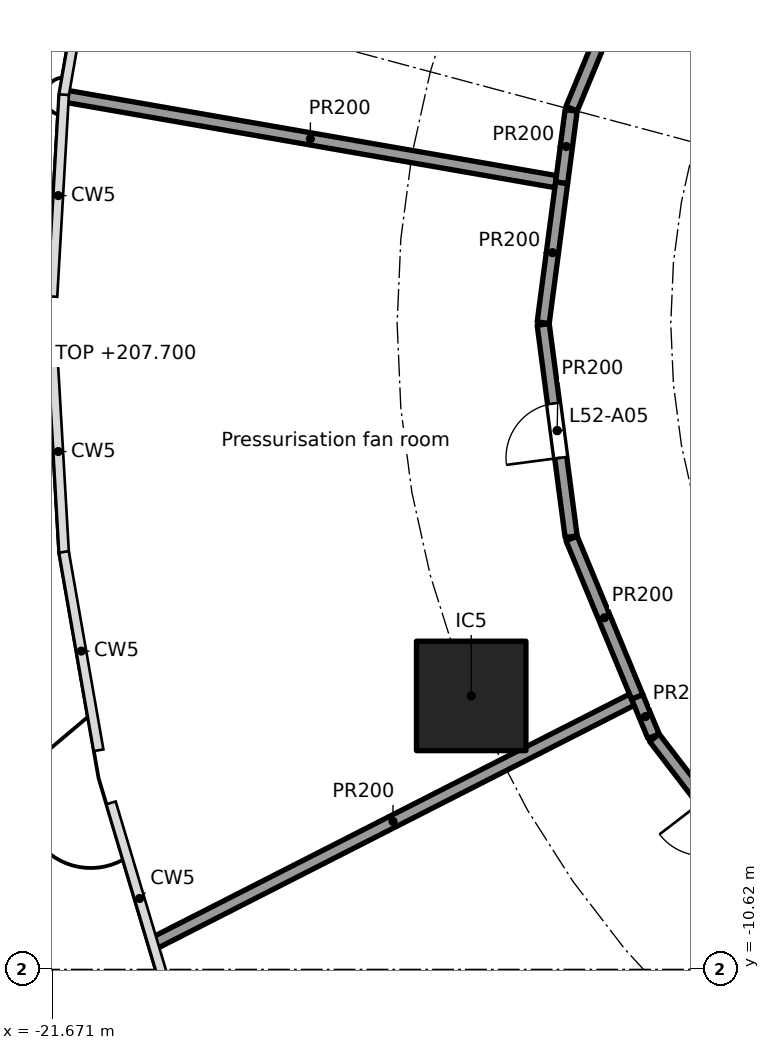
"""IFC4 building model, lengths in metres.
Left out: names, types, materials, properties, quantities, classifications, styles, units other than length and angle.
Written with IfcOpenShell. Run it as: python <this file> out.ifc"""

import sys

from ifc_helpers import new_model, si_unit, direction, frame, frame_2d, origin, origin_2d, place, context, subcontext, project, spatial, rectangle, extrude, element, fill, save


model = new_model("IFC4")
c1 = context("Model", 3, precision=1e-05, world=origin(), true_north=direction((0.0, 1.0)))
c2 = subcontext(c1, "Body", "Model", "MODEL_VIEW")
j1 = project(units=[si_unit("LENGTHUNIT", "METRE"), si_unit("PLANEANGLEUNIT", "RADIAN")], contexts=[c1])
p1 = place(None, origin())
s1 = spatial("IfcSite", under=j1, at=p1, CompositionType="ELEMENT")
p2 = place(p1, origin())
s2 = spatial("IfcBuilding", under=s1, at=p2, CompositionType="ELEMENT")
p3 = place(p2, frame((0.0, 0.0, 206.6)))
s3 = spatial("IfcBuildingStorey", under=s2, at=p3, CompositionType="ELEMENT", Elevation=206.6)
p4 = place(p3, frame((-14.782, -6.123, 0.0), z_axis=(0.0, 0.0, 1.0), x_axis=(1.0, 0.0, 0.0)))
e1 = element("IfcColumn", 1, at=p4, inside=s3, PredefinedType="COLUMN", context=c2, shape_type="SweptSolid", body=[
    extrude(rectangle(XDim=1.8, YDim=1.8, at=origin_2d()), origin(), (0.0, 0.0, 1.0), 5.6),
])
p5 = place(p3, frame((-13.598, 0.015, 0.0), z_axis=(0.0, 0.0, 1.0), x_axis=(0.130476270168, 0.991451432458, 0.0)))
e2 = element("IfcWall", 2, at=p5, inside=s3, PredefinedType="PARTITIONING", context=c2, shape_type="SweptSolid", body=[
    extrude(rectangle(XDim=2.322, YDim=0.2, at=frame_2d((1.161, 0.0))), origin(), (0.0, 0.0, 1.0), 5.34),
])
p6 = place(p3, frame((-13.394, 2.334, 0.0), z_axis=(0.0, 0.0, 1.0), x_axis=(-0.985144930299, 0.171724972867, 0.0)))
e3 = element("IfcWall", 3, at=p6, inside=s3, PredefinedType="PARTITIONING", context=c2, shape_type="SweptSolid", body=[
    extrude(rectangle(XDim=8.188, YDim=0.2, at=frame_2d((4.094, 0.0))), origin(), (0.0, 0.0, 1.0), 5.34),
])
p7 = place(p3, frame((-13.295, 2.317, 0.0), z_axis=(0.0, 0.0, 1.0), x_axis=(0.130454512571, 0.991454295543, 0.0)))
e4 = element("IfcWall", 4, at=p7, inside=s3, PredefinedType="PARTITIONING", context=c2, shape_type="SweptSolid", body=[
    extrude(rectangle(XDim=1.198, YDim=0.2, at=frame_2d((0.599, 0.0))), origin(), (0.0, 0.0, 1.0), 5.34),
])
p8 = place(p3, frame((-13.139, -3.505, 0.0), z_axis=(0.0, 0.0, 1.0), x_axis=(-0.130468866457, 0.991452406768, 0.0)))
e5 = element("IfcWall", 5, at=p8, inside=s3, PredefinedType="PARTITIONING", context=c2, shape_type="SweptSolid", body=[
    extrude(rectangle(XDim=3.52, YDim=0.2, at=frame_2d((1.76, 0.0))), origin(), (0.0, 0.0, 1.0), 5.34),
])
p9 = place(p8, frame((1.31, 0.0, 0.0)))
e6 = element("IfcOpeningElement", 6, at=p9, cuts=e5, PredefinedType="OPENING", context=c2, shape_type="SweptSolid", body=[
    extrude(rectangle(XDim=0.9, YDim=2.1, at=frame_2d((0.45, 1.05))), frame((0.0, 0.11, 0.0), z_axis=(0.0, -1.0, 0.0), x_axis=(1.0, 0.0, 0.0)), (0.0, 0.0, 1.0), 0.22),
])
p10 = place(p3, frame((-13.131, 3.534, 0.0), z_axis=(0.0, 0.0, 1.0), x_axis=(0.382723413813, 0.92386297064, 0.0)))
e7 = element("IfcWall", 7, at=p10, inside=s3, PredefinedType="PARTITIONING", context=c2, shape_type="SweptSolid", body=[
    extrude(rectangle(XDim=3.52, YDim=0.2, at=frame_2d((1.76, 0.0))), origin(), (0.0, 0.0, 1.0), 5.34),
])
p11 = place(p3, frame((-12.14, -6.186, 0.0), z_axis=(0.0, 0.0, 1.0), x_axis=(-0.891017729568, -0.453968507273, 0.0)))
e8 = element("IfcWall", 8, at=p11, inside=s3, PredefinedType="PARTITIONING", context=c2, shape_type="SweptSolid", body=[
    extrude(rectangle(XDim=8.817, YDim=0.2, at=frame_2d((4.408, 0.0))), origin(), (0.0, 0.0, 1.0), 5.34),
])
p12 = place(p3, frame((-12.051, -6.14, 0.0), z_axis=(0.0, 0.0, 1.0), x_axis=(-0.382746658536, 0.923853340839, 0.0)))
e9 = element("IfcWall", 9, at=p12, inside=s3, PredefinedType="PARTITIONING", context=c2, shape_type="SweptSolid", body=[
    extrude(rectangle(XDim=2.821, YDim=0.2, at=frame_2d((1.411, 0.0))), origin(), (0.0, 0.0, 1.0), 5.34),
])
p13 = place(p3, frame((-11.784, -6.786, 0.0), z_axis=(0.0, 0.0, 1.0), x_axis=(-0.382629548378, 0.923901850148, 0.0)))
e10 = element("IfcWall", 10, at=p13, inside=s3, PredefinedType="PARTITIONING", context=c2, shape_type="SweptSolid", body=[
    extrude(rectangle(XDim=0.699, YDim=0.2, at=frame_2d((0.349, 0.0))), origin(), (0.0, 0.0, 1.0), 5.34),
])
p14 = place(p3, frame((-9.626, -9.605, 0.0), z_axis=(0.0, 0.0, 1.0), x_axis=(-0.608697977542, 0.793402024283, 0.0)))
e11 = element("IfcWall", 11, at=p14, inside=s3, PredefinedType="PARTITIONING", context=c2, shape_type="SweptSolid", body=[
    extrude(rectangle(XDim=3.52, YDim=0.2, at=frame_2d((1.76, 0.0))), origin(), (0.0, 0.0, 1.0), 5.34),
])
p15 = place(p14, frame((1.31, 0.0, 0.0)))
e12 = element("IfcOpeningElement", 12, at=p15, cuts=e11, PredefinedType="OPENING", context=c2, shape_type="SweptSolid", body=[
    extrude(rectangle(XDim=0.9, YDim=2.1, at=frame_2d((0.45, 1.05))), frame((0.0, 0.11, 0.0), z_axis=(0.0, -1.0, 0.0), x_axis=(1.0, 0.0, 0.0)), (0.0, 0.0, 1.0), 0.22),
])
p16 = place(p3, frame((-9.117, -10.126, 0.0), z_axis=(0.0, 0.0, 1.0), x_axis=(-0.66912025522, -0.743154145554, 0.0)))
e13 = element("IfcWall", 13, at=p16, inside=s3, PredefinedType="PARTITIONING", context=c2, shape_type="SweptSolid", body=[
    extrude(rectangle(XDim=10.493, YDim=0.2, at=frame_2d((5.247, 0.0))), origin(), (0.0, 0.0, 1.0), 5.34),
])
p17 = place(p9, origin())
e14 = element("IfcDoor", 14, at=p17, inside=s3, OperationType="SINGLE_SWING_LEFT", PredefinedType="DOOR", context=c2, shape_type="SweptSolid", body=[
    extrude(rectangle(XDim=0.9, YDim=2.1, at=frame_2d((0.45, 1.05))), frame((0.0, 0.025, 0.0), z_axis=(0.0, -1.0, 0.0), x_axis=(1.0, 0.0, 0.0)), (0.0, 0.0, 1.0), 0.05),
])
fill(e6, e14)
save(model, sys.argv[1])
